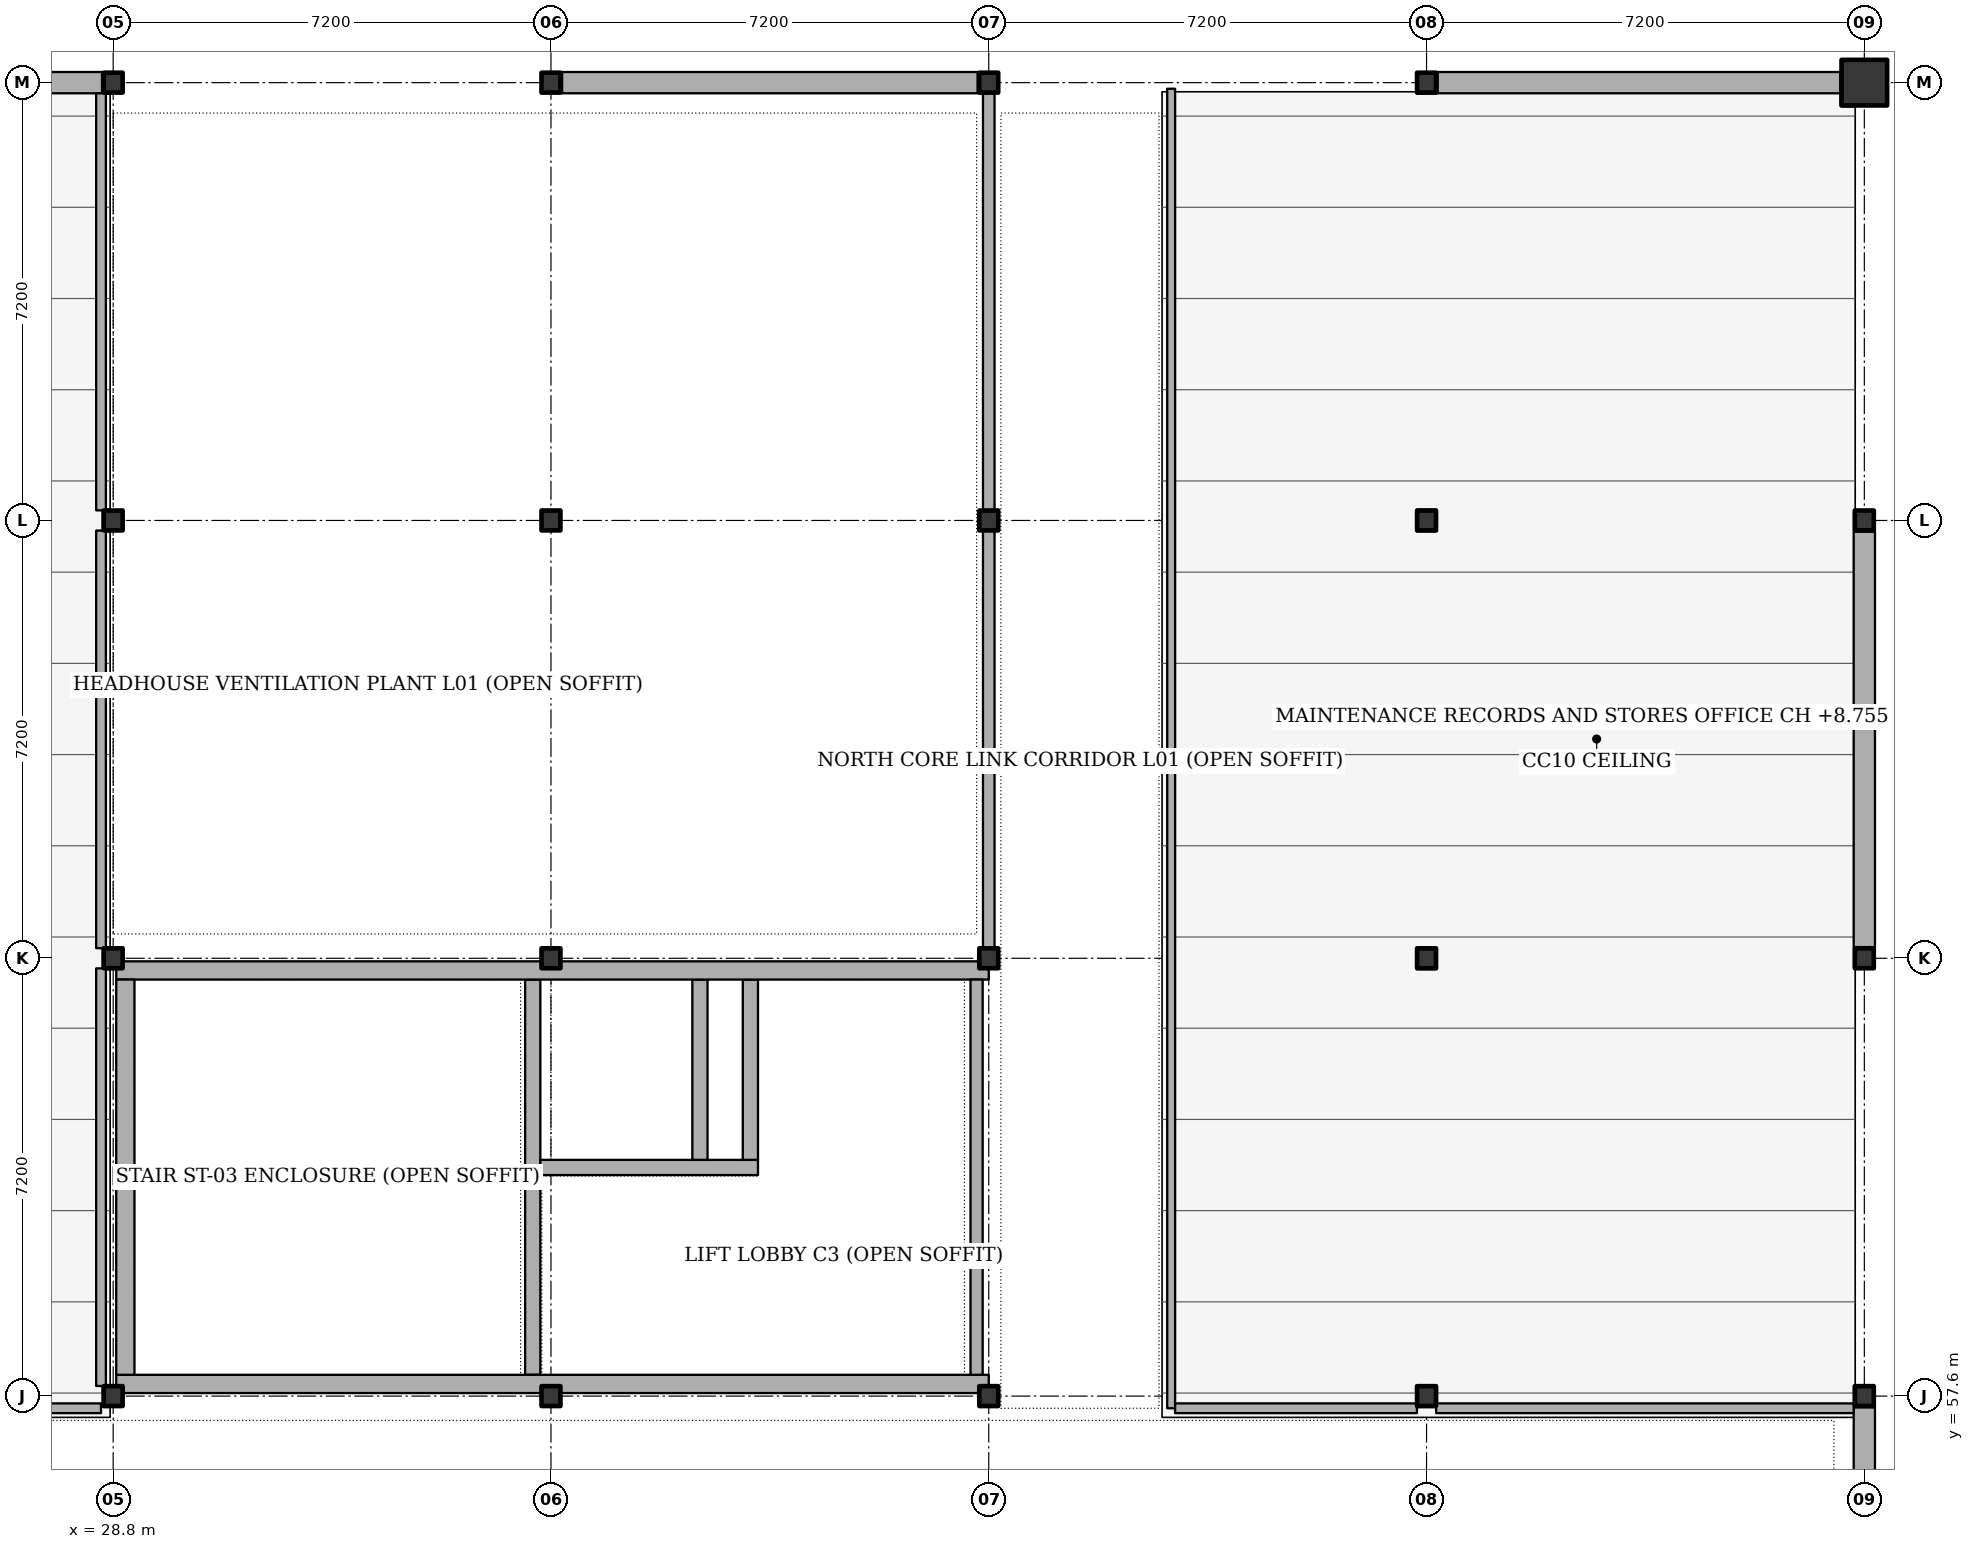
"""IFC4 building model, lengths in metres.
Left out: names, types, materials, properties, quantities, classifications, styles, units other than length and angle.
Written with IfcOpenShell. Run it as: python <this file> out.ifc"""

import sys

from ifc_helpers import new_model, si_unit, direction, frame, frame_2d, origin, origin_2d, place, context, subcontext, project, spatial, rectangle, i_section, extrude, element, fill, save


model = new_model("IFC4")
c1 = context("Model", 3, precision=1e-05, world=origin(), true_north=direction((0.0, 1.0)))
c2 = subcontext(c1, "Body", "Model", "MODEL_VIEW")
j1 = project(units=[si_unit("LENGTHUNIT", "METRE"), si_unit("PLANEANGLEUNIT", "RADIAN")], contexts=[c1])
p1 = place(None, origin())
s1 = spatial("IfcSite", under=j1, at=p1, CompositionType="ELEMENT")
p2 = place(p1, origin())
s2 = spatial("IfcBuilding", under=s1, at=p2, CompositionType="ELEMENT")
p3 = place(p2, frame((0.0, 0.0, 5.4)))
s3 = spatial("IfcBuildingStorey", under=s2, at=p3, CompositionType="ELEMENT", Elevation=5.4)
for number, where, z_axis, x_axis in (
    (1, (28.8, 57.6, 0.0), (0.0, 0.0, 1.0), (1.0, 0.0, 0.0)),
    (2, (28.8, 64.8, 0.0), (0.0, 0.0, 1.0), (1.0, 0.0, 0.0)),
    (3, (28.8, 72.0, 0.0), (0.0, 0.0, 1.0), (1.0, 0.0, 0.0)),
    (4, (28.8, 79.2, 0.0), (0.0, 0.0, 1.0), (1.0, 0.0, 0.0)),
    (5, (36.0, 57.6, 0.0), (0.0, 0.0, 1.0), (1.0, 0.0, 0.0)),
    (6, (36.0, 64.8, 0.0), (0.0, 0.0, 1.0), (1.0, 0.0, 0.0)),
    (7, (36.0, 72.0, 0.0), (0.0, 0.0, 1.0), (1.0, 0.0, 0.0)),
    (8, (36.0, 79.2, 0.0), (0.0, 0.0, 1.0), (1.0, 0.0, 0.0)),
    (9, (43.2, 57.6, 0.0), (0.0, 0.0, 1.0), (1.0, 0.0, 0.0)),
    (10, (43.2, 64.8, 0.0), (0.0, 0.0, 1.0), (1.0, 0.0, 0.0)),
    (11, (43.2, 72.0, 0.0), (0.0, 0.0, 1.0), (1.0, 0.0, 0.0)),
    (12, (43.2, 79.2, 0.0), (0.0, 0.0, 1.0), (1.0, 0.0, 0.0)),
    (13, (50.4, 57.6, 0.0), (0.0, 0.0, 1.0), (1.0, 0.0, 0.0)),
    (14, (50.4, 64.8, 0.0), (0.0, 0.0, 1.0), (1.0, 0.0, 0.0)),
    (15, (50.4, 72.0, 0.0), (0.0, 0.0, 1.0), (1.0, 0.0, 0.0)),
    (16, (50.4, 79.2, 0.0), (0.0, 0.0, 1.0), (1.0, 0.0, 0.0)),
    (17, (57.6, 57.6, 0.0), (0.0, 0.0, 1.0), (1.0, 0.0, 0.0)),
    (18, (57.6, 64.8, 0.0), (0.0, 0.0, 1.0), (1.0, 0.0, 0.0)),
    (19, (57.6, 72.0, 0.0), (0.0, 0.0, 1.0), (1.0, 0.0, 0.0)),
):
    element("IfcColumn", number, at=place(p3, frame(where, z_axis=z_axis, x_axis=x_axis)), inside=s3, PredefinedType="COLUMN", context=c2, shape_type="SweptSolid", body=[
        extrude(i_section(OverallWidth=0.311, OverallDepth=0.327, WebThickness=0.016, FlangeThickness=0.025, FilletRadius=0.015, at=origin_2d()), origin(), (0.0, 0.0, 1.0), 4.5),
    ])
p4 = place(p3, frame((57.6, 79.2, 0.0), z_axis=(0.0, 0.0, 1.0), x_axis=(1.0, 0.0, 0.0)))
e20 = element("IfcColumn", 20, at=p4, inside=s3, PredefinedType="COLUMN", context=c2, shape_type="SweptSolid", body=[
    extrude(rectangle(XDim=0.75, YDim=0.75, at=origin_2d()), origin(), (0.0, 0.0, 1.0), 4.5),
])
p5 = place(p3, frame((21.784, 79.2, 0.0), z_axis=(0.0, 0.0, 1.0), x_axis=(1.0, 0.0, 0.0)))
e21 = element("IfcWall", 21, at=p5, inside=s3, PredefinedType="SOLIDWALL", context=c2, shape_type="SweptSolid", body=[
    extrude(rectangle(XDim=6.833, YDim=0.35, at=frame_2d((3.417, 0.0))), origin(), (0.0, 0.0, 1.0), 3.478),
])
p6 = place(p5, frame((2.541, 0.0, 1.05)))
e22 = element("IfcOpeningElement", 22, at=p6, cuts=e21, PredefinedType="OPENING", context=c2, shape_type="SweptSolid", body=[
    extrude(rectangle(XDim=1.75, YDim=1.85, at=frame_2d((0.875, 0.925))), frame((0.0, 0.185, 0.0), z_axis=(0.0, -1.0, 0.0), x_axis=(1.0, 0.0, 0.0)), (0.0, 0.0, 1.0), 0.37),
])
p7 = place(p3, frame((36.184, 79.2, 0.0), z_axis=(0.0, 0.0, 1.0), x_axis=(1.0, 0.0, 0.0)))
e23 = element("IfcWall", 23, at=p7, inside=s3, PredefinedType="SOLIDWALL", context=c2, shape_type="SweptSolid", body=[
    extrude(rectangle(XDim=6.833, YDim=0.35, at=frame_2d((3.417, 0.0))), origin(), (0.0, 0.0, 1.0), 3.44),
])
p8 = place(p7, frame((2.091, 0.0, 1.05)))
e24 = element("IfcOpeningElement", 24, at=p8, cuts=e23, PredefinedType="OPENING", context=c2, shape_type="SweptSolid", body=[
    extrude(rectangle(XDim=2.65, YDim=1.6, at=frame_2d((1.325, 0.8))), frame((0.0, 0.185, 0.0), z_axis=(0.0, -1.0, 0.0), x_axis=(1.0, 0.0, 0.0)), (0.0, 0.0, 1.0), 0.37),
])
p9 = place(p3, frame((50.583, 79.2, 0.0), z_axis=(0.0, 0.0, 1.0), x_axis=(1.0, 0.0, 0.0)))
e25 = element("IfcWall", 25, at=p9, inside=s3, PredefinedType="SOLIDWALL", context=c2, shape_type="SweptSolid", body=[
    extrude(rectangle(XDim=6.622, YDim=0.35, at=frame_2d((3.311, 0.0))), origin(), (0.0, 0.0, 1.0), 3.44),
])
p10 = place(p9, frame((2.111, 0.0, 1.05)))
e26 = element("IfcOpeningElement", 26, at=p10, cuts=e25, PredefinedType="OPENING", context=c2, shape_type="SweptSolid", body=[
    extrude(rectangle(XDim=2.4, YDim=1.8, at=frame_2d((1.2, 0.9))), frame((0.0, 0.185, 0.0), z_axis=(0.0, -1.0, 0.0), x_axis=(1.0, 0.0, 0.0)), (0.0, 0.0, 1.0), 0.37),
])
p11 = place(p3, frame((57.6, 71.816, 0.0), z_axis=(0.0, 0.0, 1.0), x_axis=(0.0, -1.0, 0.0)))
e27 = element("IfcWall", 27, at=p11, inside=s3, PredefinedType="SOLIDWALL", context=c2, shape_type="SweptSolid", body=[
    extrude(rectangle(XDim=6.833, YDim=0.35, at=frame_2d((3.417, 0.0))), origin(), (0.0, 0.0, 1.0), 3.704),
])
p12 = place(p11, frame((2.916, 0.0, 1.05)))
e28 = element("IfcOpeningElement", 28, at=p12, cuts=e27, PredefinedType="OPENING", context=c2, shape_type="SweptSolid", body=[
    extrude(rectangle(XDim=1.0, YDim=1.6, at=frame_2d((0.5, 0.8))), frame((0.0, 0.185, 0.0), z_axis=(0.0, -1.0, 0.0), x_axis=(1.0, 0.0, 0.0)), (0.0, 0.0, 1.0), 0.37),
])
p13 = place(p3, frame((57.6, 57.417, 0.0), z_axis=(0.0, 0.0, 1.0), x_axis=(0.0, -1.0, 0.0)))
e29 = element("IfcWall", 29, at=p13, inside=s3, PredefinedType="SOLIDWALL", context=c2, shape_type="SweptSolid", body=[
    extrude(rectangle(XDim=6.833, YDim=0.35, at=frame_2d((3.417, 0.0))), origin(), (0.0, 0.0, 1.0), 3.478),
])
p14 = place(p13, frame((3.975, 0.0, 1.05)))
e30 = element("IfcOpeningElement", 30, at=p14, cuts=e29, PredefinedType="OPENING", context=c2, shape_type="SweptSolid", body=[
    extrude(rectangle(XDim=1.75, YDim=1.85, at=frame_2d((0.875, 0.925))), frame((0.0, 0.185, 0.0), z_axis=(0.0, -1.0, 0.0), x_axis=(1.0, 0.0, 0.0)), (0.0, 0.0, 1.0), 0.37),
])
p15 = place(p3, frame((35.7, 57.95, 0.0), z_axis=(0.0, 0.0, 1.0), x_axis=(0.0, 1.0, 0.0)))
e31 = element("IfcWall", 31, at=p15, inside=s3, PredefinedType="SHEAR", context=c2, shape_type="SweptSolid", body=[
    extrude(rectangle(XDim=6.5, YDim=0.25, at=frame_2d((3.25, 0.0))), origin(), (0.0, 0.0, 1.0), 3.55),
])
p16 = place(p15, frame((0.95, 0.0, 0.0)))
e32 = element("IfcOpeningElement", 32, at=p16, cuts=e31, PredefinedType="OPENING", context=c2, shape_type="SweptSolid", body=[
    extrude(rectangle(XDim=1.35, YDim=2.15, at=frame_2d((0.675, 1.075))), frame((0.0, 0.135, 0.0), z_axis=(0.0, -1.0, 0.0), x_axis=(1.0, 0.0, 0.0)), (0.0, 0.0, 1.0), 0.27),
])
p17 = place(p3, frame((35.825, 61.36, 0.0), z_axis=(0.0, 0.0, 1.0), x_axis=(1.0, 0.0, 0.0)))
e33 = element("IfcWall", 33, at=p17, inside=s3, PredefinedType="SHEAR", context=c2, shape_type="SweptSolid", body=[
    extrude(rectangle(XDim=3.58, YDim=0.25, at=frame_2d((1.79, 0.0))), origin(), (0.0, 0.0, 1.0), 3.55),
])
p18 = place(p17, frame((0.775, 0.0, 0.0)))
e34 = element("IfcOpeningElement", 34, at=p18, cuts=e33, PredefinedType="OPENING", context=c2, shape_type="SweptSolid", body=[
    extrude(rectangle(XDim=1.1, YDim=2.15, at=frame_2d((0.55, 1.075))), frame((0.0, 0.135, 0.0), z_axis=(0.0, -1.0, 0.0), x_axis=(1.0, 0.0, 0.0)), (0.0, 0.0, 1.0), 0.27),
])
p19 = place(p3, frame((38.45, 61.485, 0.0), z_axis=(0.0, 0.0, 1.0), x_axis=(0.0, 1.0, 0.0)))
e35 = element("IfcWall", 35, at=p19, inside=s3, PredefinedType="SHEAR", context=c2, shape_type="SweptSolid", body=[
    extrude(rectangle(XDim=2.965, YDim=0.25, at=frame_2d((1.482, 0.0))), origin(), (0.0, 0.0, 1.0), 3.55),
])
p20 = place(p3, frame((39.28, 61.485, 0.0), z_axis=(0.0, 0.0, 1.0), x_axis=(0.0, 1.0, 0.0)))
e36 = element("IfcWall", 36, at=p20, inside=s3, PredefinedType="SHEAR", context=c2, shape_type="SweptSolid", body=[
    extrude(rectangle(XDim=2.965, YDim=0.25, at=frame_2d((1.482, 0.0))), origin(), (0.0, 0.0, 1.0), 3.55),
])
p21 = place(p20, frame((0.9, 0.0, 0.0)))
e37 = element("IfcOpeningElement", 37, at=p21, cuts=e36, PredefinedType="OPENING", context=c2, shape_type="SweptSolid", body=[
    extrude(rectangle(XDim=0.92, YDim=2.05, at=frame_2d((0.46, 1.025))), frame((0.0, 0.135, 0.0), z_axis=(0.0, -1.0, 0.0), x_axis=(1.0, 0.0, 0.0)), (0.0, 0.0, 1.0), 0.27),
])
p22 = place(p3, frame((28.85, 57.8, 0.0), z_axis=(0.0, 0.0, 1.0), x_axis=(1.0, 0.0, 0.0)))
e38 = element("IfcWall", 38, at=p22, inside=s3, PredefinedType="SHEAR", context=c2, shape_type="SweptSolid", body=[
    extrude(rectangle(XDim=14.35, YDim=0.3, at=frame_2d((7.175, 0.0))), origin(), (0.0, 0.0, 1.0), 3.55),
])
p23 = place(p22, frame((11.5, 0.0, 0.0)))
e39 = element("IfcOpeningElement", 39, at=p23, cuts=e38, PredefinedType="OPENING", context=c2, shape_type="SweptSolid", body=[
    extrude(rectangle(XDim=1.5, YDim=2.15, at=frame_2d((0.75, 1.075))), frame((0.0, 0.16, 0.0), z_axis=(0.0, -1.0, 0.0), x_axis=(1.0, 0.0, 0.0)), (0.0, 0.0, 1.0), 0.32),
])
p24 = place(p3, frame((28.85, 64.6, 0.0), z_axis=(0.0, 0.0, 1.0), x_axis=(1.0, 0.0, 0.0)))
e40 = element("IfcWall", 40, at=p24, inside=s3, PredefinedType="SHEAR", context=c2, shape_type="SweptSolid", body=[
    extrude(rectangle(XDim=14.35, YDim=0.3, at=frame_2d((7.175, 0.0))), origin(), (0.0, 0.0, 1.0), 3.55),
])
p25 = place(p3, frame((29.0, 57.95, 0.0), z_axis=(0.0, 0.0, 1.0), x_axis=(0.0, 1.0, 0.0)))
e41 = element("IfcWall", 41, at=p25, inside=s3, PredefinedType="SHEAR", context=c2, shape_type="SweptSolid", body=[
    extrude(rectangle(XDim=6.5, YDim=0.3, at=frame_2d((3.25, 0.0))), origin(), (0.0, 0.0, 1.0), 3.55),
])
p26 = place(p3, frame((43.0, 57.95, 0.0), z_axis=(0.0, 0.0, 1.0), x_axis=(0.0, 1.0, 0.0)))
e42 = element("IfcWall", 42, at=p26, inside=s3, PredefinedType="SOLIDWALL", context=c2, shape_type="SweptSolid", body=[
    extrude(rectangle(XDim=6.5, YDim=0.2, at=frame_2d((3.25, 0.0))), origin(), (0.0, 0.0, 1.0), 3.55),
])
p27 = place(p3, frame((21.758, 57.4, 0.0), z_axis=(0.0, 0.0, 1.0), x_axis=(1.0, 0.0, 0.0)))
e43 = element("IfcWall", 43, at=p27, inside=s3, PredefinedType="PARTITIONING", context=c2, shape_type="SweptSolid", body=[
    extrude(rectangle(XDim=6.842, YDim=0.16, at=frame_2d((3.421, 0.0))), origin(), (0.0, 0.0, 1.0), 3.55),
])
p28 = place(p3, frame((43.2, 64.966, 0.0), z_axis=(0.0, 0.0, 1.0), x_axis=(0.0, 1.0, 0.0)))
e44 = element("IfcWall", 44, at=p28, inside=s3, PredefinedType="PARTITIONING", context=c2, shape_type="SweptSolid", body=[
    extrude(rectangle(XDim=6.868, YDim=0.19, at=frame_2d((3.434, 0.0))), origin(), (0.0, 0.0, 1.0), 3.55),
])
p29 = place(p28, frame((2.926, 0.0, 0.0)))
e45 = element("IfcOpeningElement", 45, at=p29, cuts=e44, PredefinedType="OPENING", context=c2, shape_type="SweptSolid", body=[
    extrude(rectangle(XDim=1.25, YDim=2.15, at=frame_2d((0.625, 1.075))), frame((0.0, 0.105, 0.0), z_axis=(0.0, -1.0, 0.0), x_axis=(1.0, 0.0, 0.0)), (0.0, 0.0, 1.0), 0.21),
])
p30 = place(p3, frame((43.2, 72.166, 0.0), z_axis=(0.0, 0.0, 1.0), x_axis=(0.0, 1.0, 0.0)))
e46 = element("IfcWall", 46, at=p30, inside=s3, PredefinedType="PARTITIONING", context=c2, shape_type="SweptSolid", body=[
    extrude(rectangle(XDim=6.859, YDim=0.19, at=frame_2d((3.429, 0.0))), origin(), (0.0, 0.0, 1.0), 3.435),
])
p31 = place(p3, frame((46.2, 57.4, 0.0), z_axis=(0.0, 0.0, 1.0), x_axis=(0.0, 1.0, 0.0)))
e47 = element("IfcWall", 47, at=p31, inside=s3, PredefinedType="PARTITIONING", context=c2, shape_type="SweptSolid", body=[
    extrude(rectangle(XDim=21.7, YDim=0.13, at=frame_2d((10.85, 0.0))), origin(), (0.0, 0.0, 1.0), 3.435),
])
p32 = place(p31, frame((17.628, 0.0, 0.0)))
e48 = element("IfcOpeningElement", 48, at=p32, cuts=e47, PredefinedType="OPENING", context=c2, shape_type="SweptSolid", body=[
    extrude(rectangle(XDim=1.08, YDim=2.15, at=frame_2d((0.54, 1.075))), frame((0.0, 0.075, 0.0), z_axis=(0.0, -1.0, 0.0), x_axis=(1.0, 0.0, 0.0)), (0.0, 0.0, 1.0), 0.15),
])
for number, where, z_axis, x_axis in (
    (49, (28.6, 57.766, 0.0), (0.0, 0.0, 1.0), (0.0, 1.0, 0.0)),
    (50, (28.6, 64.966, 0.0), (0.0, 0.0, 1.0), (0.0, 1.0, 0.0)),
):
    element("IfcWall", number, at=place(p3, frame(where, z_axis=z_axis, x_axis=x_axis)), inside=s3, PredefinedType="PARTITIONING", context=c2, shape_type="SweptSolid", body=[
        extrude(rectangle(XDim=6.868, YDim=0.16, at=frame_2d((3.434, 0.0))), origin(), (0.0, 0.0, 1.0), 3.55),
    ])
p33 = place(p3, frame((28.6, 72.166, 0.0), z_axis=(0.0, 0.0, 1.0), x_axis=(0.0, 1.0, 0.0)))
e51 = element("IfcWall", 51, at=p33, inside=s3, PredefinedType="PARTITIONING", context=c2, shape_type="SweptSolid", body=[
    extrude(rectangle(XDim=6.859, YDim=0.16, at=frame_2d((3.429, 0.0))), origin(), (0.0, 0.0, 1.0), 3.55),
])
p34 = place(p3, frame((46.265, 57.4, 0.0), z_axis=(0.0, 0.0, 1.0), x_axis=(1.0, 0.0, 0.0)))
e52 = element("IfcWall", 52, at=p34, inside=s3, PredefinedType="PARTITIONING", context=c2, shape_type="SweptSolid", body=[
    extrude(rectangle(XDim=3.977, YDim=0.16, at=frame_2d((1.989, 0.0))), origin(), (0.0, 0.0, 1.0), 3.55),
])
p35 = place(p3, frame((50.558, 57.4, 0.0), z_axis=(0.0, 0.0, 1.0), x_axis=(1.0, 0.0, 0.0)))
e53 = element("IfcWall", 53, at=p35, inside=s3, PredefinedType="PARTITIONING", context=c2, shape_type="SweptSolid", body=[
    extrude(rectangle(XDim=6.867, YDim=0.16, at=frame_2d((3.434, 0.0))), origin(), (0.0, 0.0, 1.0), 3.55),
])
p36 = place(p8, origin())
e54 = element("IfcWindow", 54, at=p36, inside=s3, PartitioningType="SINGLE_PANEL", PredefinedType="WINDOW", context=c2, shape_type="SweptSolid", body=[
    extrude(rectangle(XDim=2.65, YDim=1.6, at=frame_2d((1.325, 0.8))), frame((0.0, 0.03, 0.0), z_axis=(0.0, -1.0, 0.0), x_axis=(1.0, 0.0, 0.0)), (0.0, 0.0, 1.0), 0.06),
])
fill(e24, e54)
p37 = place(p10, origin())
e55 = element("IfcWindow", 55, at=p37, inside=s3, PartitioningType="SINGLE_PANEL", PredefinedType="WINDOW", context=c2, shape_type="SweptSolid", body=[
    extrude(rectangle(XDim=2.4, YDim=1.8, at=frame_2d((1.2, 0.9))), frame((0.0, 0.03, 0.0), z_axis=(0.0, -1.0, 0.0), x_axis=(1.0, 0.0, 0.0)), (0.0, 0.0, 1.0), 0.06),
])
fill(e26, e55)
p38 = place(p12, origin())
e56 = element("IfcWindow", 56, at=p38, inside=s3, PartitioningType="SINGLE_PANEL", PredefinedType="WINDOW", context=c2, shape_type="SweptSolid", body=[
    extrude(rectangle(XDim=1.0, YDim=1.6, at=frame_2d((0.5, 0.8))), frame((0.0, 0.03, 0.0), z_axis=(0.0, -1.0, 0.0), x_axis=(1.0, 0.0, 0.0)), (0.0, 0.0, 1.0), 0.06),
])
fill(e28, e56)
p39 = place(p16, origin())
e57 = element("IfcDoor", 57, at=p39, inside=s3, OperationType="SINGLE_SWING_LEFT", PredefinedType="DOOR", context=c2, shape_type="SweptSolid", body=[
    extrude(rectangle(XDim=1.35, YDim=2.15, at=frame_2d((0.675, 1.075))), frame((0.0, 0.025, 0.0), z_axis=(0.0, -1.0, 0.0), x_axis=(1.0, 0.0, 0.0)), (0.0, 0.0, 1.0), 0.05),
])
fill(e32, e57)
p40 = place(p18, origin())
e58 = element("IfcDoor", 58, at=p40, inside=s3, OperationType="SLIDING_TO_LEFT", PredefinedType="DOOR", context=c2, shape_type="SweptSolid", body=[
    extrude(rectangle(XDim=1.1, YDim=2.15, at=frame_2d((0.55, 1.075))), frame((0.0, 0.025, 0.0), z_axis=(0.0, -1.0, 0.0), x_axis=(1.0, 0.0, 0.0)), (0.0, 0.0, 1.0), 0.05),
])
fill(e34, e58)
p41 = place(p21, origin())
e59 = element("IfcDoor", 59, at=p41, inside=s3, OperationType="SINGLE_SWING_RIGHT", PredefinedType="DOOR", context=c2, shape_type="SweptSolid", body=[
    extrude(rectangle(XDim=0.92, YDim=2.05, at=frame_2d((0.46, 1.025))), frame((0.0, 0.025, 0.0), z_axis=(0.0, -1.0, 0.0), x_axis=(1.0, 0.0, 0.0)), (0.0, 0.0, 1.0), 0.05),
])
fill(e37, e59)
p42 = place(p23, origin())
e60 = element("IfcDoor", 60, at=p42, inside=s3, OperationType="SINGLE_SWING_LEFT", PredefinedType="DOOR", context=c2, shape_type="SweptSolid", body=[
    extrude(rectangle(XDim=1.5, YDim=2.15, at=frame_2d((0.75, 1.075))), frame((0.0, 0.025, 0.0), z_axis=(0.0, -1.0, 0.0), x_axis=(1.0, 0.0, 0.0)), (0.0, 0.0, 1.0), 0.05),
])
fill(e39, e60)
p43 = place(p29, origin())
e61 = element("IfcDoor", 61, at=p43, inside=s3, OperationType="SINGLE_SWING_LEFT", PredefinedType="DOOR", context=c2, shape_type="SweptSolid", body=[
    extrude(rectangle(XDim=1.25, YDim=2.15, at=frame_2d((0.625, 1.075))), frame((0.0, 0.025, 0.0), z_axis=(0.0, -1.0, 0.0), x_axis=(1.0, 0.0, 0.0)), (0.0, 0.0, 1.0), 0.05),
])
fill(e45, e61)
p44 = place(p32, origin())
e62 = element("IfcDoor", 62, at=p44, inside=s3, OperationType="SINGLE_SWING_RIGHT", PredefinedType="DOOR", context=c2, shape_type="SweptSolid", body=[
    extrude(rectangle(XDim=1.08, YDim=2.15, at=frame_2d((0.54, 1.075))), frame((0.0, 0.025, 0.0), z_axis=(0.0, -1.0, 0.0), x_axis=(1.0, 0.0, 0.0)), (0.0, 0.0, 1.0), 0.05),
])
fill(e48, e62)
save(model, sys.argv[1])
